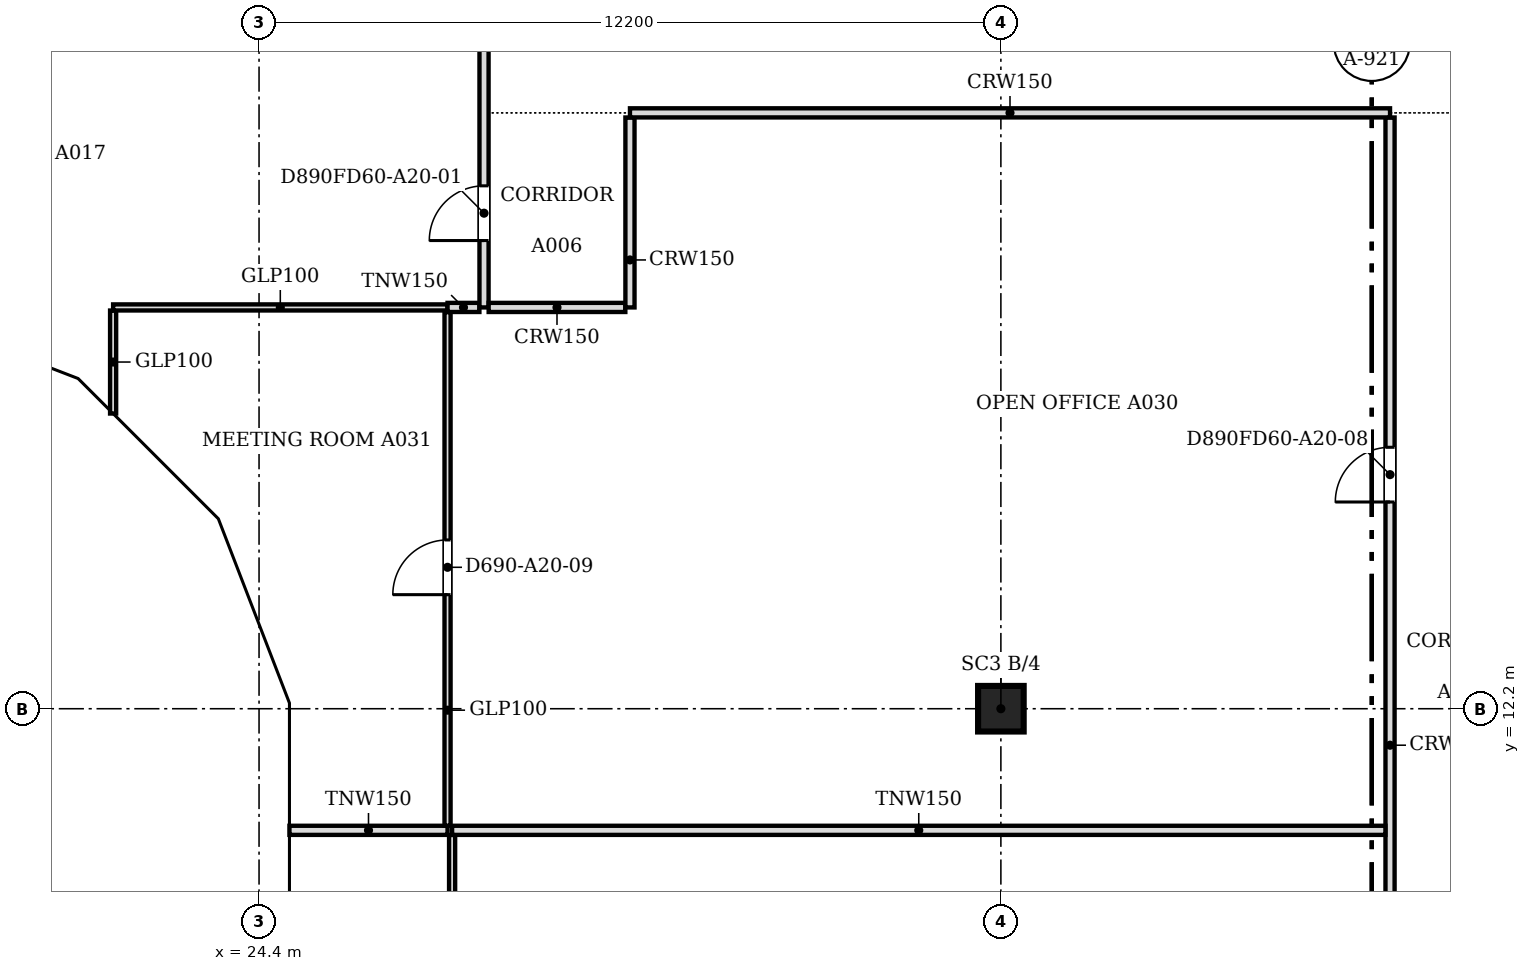
"""IFC4 building model, lengths in metres.
Left out: names, types, materials, properties, quantities, classifications, styles, units other than length and angle.
Written with IfcOpenShell. Run it as: python <this file> out.ifc"""

import sys

from ifc_helpers import new_model, si_unit, direction, frame, frame_2d, origin, origin_2d, place, context, subcontext, project, spatial, polyline, rectangle, outline, extrude, faceted_brep, source, transform, mapped, element, fill, save


model = new_model("IFC4")
c1 = context("Model", 3, precision=1e-05, world=origin(), true_north=direction((0.0, 1.0)))
c2 = subcontext(c1, "Body", "Model", "MODEL_VIEW")
j1 = project(units=[si_unit("LENGTHUNIT", "METRE"), si_unit("PLANEANGLEUNIT", "RADIAN")], contexts=[c1])
p1 = place(None, origin())
s1 = spatial("IfcSite", under=j1, at=p1, CompositionType="ELEMENT")
p2 = place(p1, origin())
s2 = spatial("IfcBuilding", under=s1, at=p2, CompositionType="ELEMENT")
p3 = place(p2, frame((0.0, 0.0, 220.7)))
s3 = spatial("IfcBuildingStorey", under=s2, at=p3, CompositionType="ELEMENT", Elevation=220.7)
p4 = place(p3, frame((36.6, 12.2, 0.0), z_axis=(0.0, 0.0, 1.0), x_axis=(1.0, 0.0, 0.0)))
e1 = element("IfcColumn", 1, at=p4, inside=s3, PredefinedType="COLUMN", context=c2, shape_type="SweptSolid", body=[
    extrude(rectangle(XDim=0.75, YDim=0.75, at=origin_2d()), origin(), (0.0, 0.0, 1.0), 3.6),
])
m1 = source(origin(), c2, "Body", "Brep", [
    faceted_brep([(0.093, -0.25, 0.056), (3.143, -0.25, 3.736), (3.143, -0.25, 3.864), (0.093, -0.25, 7.544), (0.0, 0.25, 7.543), (0.047, 0.25, 7.6), (3.196, 0.25, 3.8), (0.047, 0.25, 0.0), (0.0, 0.25, 0.057), (3.196, -0.0, 3.8), (0.047, 0.0, 0.0), (0.047, 0.0, 7.6)], [[[0, 1, 2, 3]], [[4, 5, 6, 7, 8]], [[7, 6, 9, 1, 0, 10]], [[6, 5, 11, 3, 2, 9]], [[5, 4, 11]], [[8, 7, 10]], [[8, 10, 0, 3, 11, 4]], [[1, 9, 2]]]),
])
p5 = place(p3, frame((18.303, 18.567, -3.8), z_axis=(0.0, 0.0, 1.0), x_axis=(0.932978940178, -0.359930961693, 0.0)))
e2 = element("IfcWall", 2, at=p5, inside=s3, PredefinedType="SOLIDWALL", context=c2, shape_type="MappedRepresentation", body=[
    mapped(m1, transform((0.0, 0.0, 0.0), scale=1.0)),
])
m2 = source(origin(), c2, "Body", "SweptSolid", [
    extrude(outline(polyline([(0.247, 0.633), (2.871, 3.8), (0.247, 6.967), (0.247, 0.633)])), frame((0.0, 0.26, 0.0), z_axis=(0.0, -1.0, 0.0), x_axis=(1.0, 0.0, 0.0)), (0.0, 0.0, 1.0), 0.52),
])
p6 = place(p5, origin())
e3 = element("IfcOpeningElement", 3, at=p6, cuts=e2, PredefinedType="OPENING", context=c2, shape_type="MappedRepresentation", body=[
    mapped(m2, transform((0.0, 0.0, 0.0), scale=1.0)),
])
m3 = source(origin(), c2, "Body", "Brep", [
    faceted_brep([(3.103, -0.25, 7.536), (0.053, -0.25, 3.864), (0.053, -0.25, 3.736), (3.103, -0.25, 0.064), (0.0, 0.25, 3.8), (3.156, 0.25, 7.6), (3.209, 0.25, 7.536), (3.209, 0.25, 0.064), (3.156, 0.25, 0.0), (3.156, -0.0, 0.0), (3.156, -0.0, 7.6), (0.0, 0.0, 3.8)], [[[0, 1, 2, 3]], [[4, 5, 6, 7, 8]], [[8, 7, 9]], [[6, 5, 10]], [[5, 4, 11, 1, 0, 10]], [[4, 8, 9, 3, 2, 11]], [[11, 2, 1]], [[3, 9, 7, 6, 10, 0]]]),
])
p7 = place(p3, frame((21.285, 17.417, -3.8), z_axis=(0.0, 0.0, 1.0), x_axis=(0.707106781187, -0.707106781187, 0.0)))
e4 = element("IfcWall", 4, at=p7, inside=s3, PredefinedType="SOLIDWALL", context=c2, shape_type="MappedRepresentation", body=[
    mapped(m3, transform((0.0, 0.0, 0.0), scale=1.0)),
])
m4 = source(origin(), c2, "Body", "SweptSolid", [
    extrude(outline(polyline([(2.956, 6.968), (0.325, 3.8), (2.956, 0.632), (2.956, 6.968)])), frame((0.0, 0.26, 0.0), z_axis=(0.0, -1.0, 0.0), x_axis=(1.0, 0.0, 0.0)), (0.0, 0.0, 1.0), 0.52),
])
p8 = place(p7, origin())
e5 = element("IfcOpeningElement", 5, at=p8, cuts=e4, PredefinedType="OPENING", context=c2, shape_type="MappedRepresentation", body=[
    mapped(m4, transform((0.0, 0.0, 0.0), scale=1.0)),
])
m5 = source(origin(), c2, "Body", "Brep", [
    faceted_brep([(0.106, -0.25, 0.064), (3.156, -0.25, 3.744), (3.156, -0.25, 3.856), (0.106, -0.25, 7.536), (0.0, 0.25, 7.536), (0.053, 0.25, 7.6), (3.202, 0.25, 3.8), (0.053, 0.25, 0.0), (0.0, 0.25, 0.064), (3.202, -0.0, 3.8), (0.053, 0.0, 0.0), (0.053, 0.0, 7.6)], [[[0, 1, 2, 3]], [[4, 5, 6, 7, 8]], [[7, 6, 9, 1, 0, 10]], [[6, 5, 11, 3, 2, 9]], [[5, 4, 11]], [[8, 7, 10]], [[8, 10, 0, 3, 11, 4]], [[1, 9, 2]]]),
])
p9 = place(p3, frame((23.497, 15.234, -3.8), z_axis=(0.0, 0.0, 1.0), x_axis=(0.359913782069, -0.932985567668, 0.0)))
e6 = element("IfcWall", 6, at=p9, inside=s3, PredefinedType="SOLIDWALL", context=c2, shape_type="MappedRepresentation", body=[
    mapped(m5, transform((0.0, 0.0, 0.0), scale=1.0)),
])
m6 = source(origin(), c2, "Body", "SweptSolid", [
    extrude(outline(polyline([(0.253, 0.633), (2.878, 3.8), (0.253, 6.967), (0.253, 0.633)])), frame((0.0, 0.26, 0.0), z_axis=(0.0, -1.0, 0.0), x_axis=(1.0, 0.0, 0.0)), (0.0, 0.0, 1.0), 0.52),
])
p10 = place(p9, origin())
e7 = element("IfcOpeningElement", 7, at=p10, cuts=e6, PredefinedType="OPENING", context=c2, shape_type="MappedRepresentation", body=[
    mapped(m6, transform((0.0, 0.0, 0.0), scale=1.0)),
])
m7 = source(origin(), c2, "Body", "Brep", [
    faceted_brep([(3.096, -0.25, 0.0), (6.1, -0.25, 3.8), (3.096, -0.25, 7.6), (0.047, -0.25, 3.857), (0.047, -0.25, 3.743), (0.0, 0.25, 3.8), (3.096, 0.25, 7.6), (6.053, 0.25, 3.859), (6.053, 0.25, 3.741), (3.096, 0.25, 0.0), (6.1, -0.0, 3.8), (0.0, 0.0, 3.8)], [[[0, 1, 2, 3, 4]], [[5, 6, 7, 8, 9]], [[9, 8, 10, 1, 0]], [[7, 6, 2, 1, 10]], [[6, 5, 11, 3, 2]], [[5, 9, 0, 4, 11]], [[11, 4, 3]], [[10, 8, 7]]]),
])
p11 = place(p3, frame((24.65, 12.247, -3.8), z_axis=(0.0, 0.0, 1.0), x_axis=(0.0, -1.0, 0.0)))
e8 = element("IfcWall", 8, at=p11, inside=s3, PredefinedType="SOLIDWALL", context=c2, shape_type="MappedRepresentation", body=[
    mapped(m7, transform((0.0, 0.0, 0.0), scale=1.0)),
])
m8 = source(origin(), c2, "Body", "SweptSolid", [
    extrude(outline(polyline([(3.094, 0.399), (5.781, 3.8), (3.094, 7.201), (0.323, 3.8), (3.094, 0.399)])), frame((0.0, 0.26, 0.0), z_axis=(0.0, -1.0, 0.0), x_axis=(1.0, 0.0, 0.0)), (0.0, 0.0, 1.0), 0.52),
])
p12 = place(p11, origin())
e9 = element("IfcOpeningElement", 9, at=p12, cuts=e8, PredefinedType="OPENING", context=c2, shape_type="MappedRepresentation", body=[
    mapped(m8, transform((0.0, 0.0, 0.0), scale=1.0)),
])
p13 = place(p2, frame((0.0, 0.0, 224.5)))
s4 = spatial("IfcBuildingStorey", under=s2, at=p13, CompositionType="ELEMENT", Elevation=224.5)
m9 = source(origin(), c2, "Body", "Brep", [
    faceted_brep([(3.096, -0.25, 7.536), (0.047, -0.25, 3.856), (0.047, -0.25, 3.744), (3.096, -0.25, 0.064), (0.0, 0.25, 3.8), (3.149, 0.25, 7.6), (3.202, 0.25, 7.536), (3.202, 0.25, 0.064), (3.149, 0.25, 0.0), (3.149, -0.0, 0.0), (3.149, -0.0, 7.6), (0.0, 0.0, 3.8)], [[[0, 1, 2, 3]], [[4, 5, 6, 7, 8]], [[8, 7, 9]], [[6, 5, 10]], [[5, 4, 11, 1, 0, 10]], [[4, 8, 9, 3, 2, 11]], [[11, 2, 1]], [[3, 9, 7, 6, 10, 0]]]),
])
p14 = place(p13, frame((18.346, 18.55, -3.8), z_axis=(0.0, 0.0, 1.0), x_axis=(0.932985567668, -0.359913782069, 0.0)))
e10 = element("IfcWall", 10, at=p14, inside=s4, PredefinedType="SOLIDWALL", context=c2, shape_type="MappedRepresentation", body=[
    mapped(m9, transform((0.0, 0.0, 0.0), scale=1.0)),
])
m10 = source(origin(), c2, "Body", "SweptSolid", [
    extrude(outline(polyline([(2.949, 6.967), (0.325, 3.8), (2.949, 0.633), (2.949, 6.967)])), frame((0.0, 0.26, 0.0), z_axis=(0.0, -1.0, 0.0), x_axis=(1.0, 0.0, 0.0)), (0.0, 0.0, 1.0), 0.52),
])
p15 = place(p14, origin())
e11 = element("IfcOpeningElement", 11, at=p15, cuts=e10, PredefinedType="OPENING", context=c2, shape_type="MappedRepresentation", body=[
    mapped(m10, transform((0.0, 0.0, 0.0), scale=1.0)),
])
m11 = source(origin(), c2, "Body", "Brep", [
    faceted_brep([(0.106, -0.25, 0.064), (3.156, -0.25, 3.736), (3.156, -0.25, 3.864), (0.106, -0.25, 7.536), (0.0, 0.25, 7.536), (0.053, 0.25, 7.6), (3.209, 0.25, 3.8), (0.053, 0.25, 0.0), (0.0, 0.25, 0.064), (3.209, -0.0, 3.8), (0.053, 0.0, 0.0), (0.053, 0.0, 7.6)], [[[0, 1, 2, 3]], [[4, 5, 6, 7, 8]], [[7, 6, 9, 1, 0, 10]], [[6, 5, 11, 3, 2, 9]], [[5, 4, 11]], [[8, 7, 10]], [[8, 10, 0, 3, 11, 4]], [[1, 9, 2]]]),
])
p16 = place(p13, frame((21.248, 17.454, -3.8), z_axis=(0.0, 0.0, 1.0), x_axis=(0.707106781187, -0.707106781187, 0.0)))
e12 = element("IfcWall", 12, at=p16, inside=s4, PredefinedType="SOLIDWALL", context=c2, shape_type="MappedRepresentation", body=[
    mapped(m11, transform((0.0, 0.0, 0.0), scale=1.0)),
])
m12 = source(origin(), c2, "Body", "SweptSolid", [
    extrude(outline(polyline([(0.253, 0.632), (2.884, 3.8), (0.253, 6.968), (0.253, 0.632)])), frame((0.0, 0.26, 0.0), z_axis=(0.0, -1.0, 0.0), x_axis=(1.0, 0.0, 0.0)), (0.0, 0.0, 1.0), 0.52),
])
p17 = place(p16, origin())
e13 = element("IfcOpeningElement", 13, at=p17, cuts=e12, PredefinedType="OPENING", context=c2, shape_type="MappedRepresentation", body=[
    mapped(m12, transform((0.0, 0.0, 0.0), scale=1.0)),
])
m13 = source(origin(), c2, "Body", "Brep", [
    faceted_brep([(3.103, -0.25, 7.544), (0.053, -0.25, 3.864), (0.053, -0.25, 3.736), (3.103, -0.25, 0.056), (0.0, 0.25, 3.8), (3.149, 0.25, 7.6), (3.196, 0.25, 7.543), (3.196, 0.25, 0.057), (3.149, 0.25, 0.0), (3.149, -0.0, 0.0), (3.149, -0.0, 7.6), (0.0, 0.0, 3.8)], [[[0, 1, 2, 3]], [[4, 5, 6, 7, 8]], [[8, 7, 9]], [[6, 5, 10]], [[5, 4, 11, 1, 0, 10]], [[4, 8, 9, 3, 2, 11]], [[11, 2, 1]], [[3, 9, 7, 6, 10, 0]]]),
])
p18 = place(p13, frame((23.517, 15.185, -3.8), z_axis=(0.0, 0.0, 1.0), x_axis=(0.359864468756, -0.933004589553, 0.0)))
e14 = element("IfcWall", 14, at=p18, inside=s4, PredefinedType="SOLIDWALL", context=c2, shape_type="MappedRepresentation", body=[
    mapped(m13, transform((0.0, 0.0, 0.0), scale=1.0)),
])
p19 = place(p18, origin())
e15 = element("IfcOpeningElement", 15, at=p19, cuts=e14, PredefinedType="OPENING", context=c2, shape_type="MappedRepresentation", body=[
    mapped(m10, transform((0.0, 0.0, 0.0), scale=1.0)),
])
m14 = source(origin(), c2, "Body", "Brep", [
    faceted_brep([(0.093, -0.25, 0.057), (3.143, -0.25, 3.8), (0.093, -0.25, 7.543), (0.0, 0.25, 7.544), (0.047, 0.25, 7.6), (3.143, 0.25, 3.8), (0.047, 0.25, 0.0), (0.0, 0.25, 0.056), (0.047, 0.0, 0.0), (0.047, 0.0, 7.6)], [[[0, 1, 2]], [[3, 4, 5, 6, 7]], [[6, 5, 1, 0, 8]], [[5, 4, 9, 2, 1]], [[4, 3, 9]], [[7, 6, 8]], [[7, 8, 0, 2, 9, 3]]]),
])
p20 = place(p13, frame((24.65, 12.293, -3.8), z_axis=(0.0, 0.0, 1.0), x_axis=(0.0, -1.0, 0.0)))
e16 = element("IfcWall", 16, at=p20, inside=s4, PredefinedType="SOLIDWALL", context=c2, shape_type="MappedRepresentation", body=[
    mapped(m14, transform((0.0, 0.0, 0.0), scale=1.0)),
])
m15 = source(origin(), c2, "Body", "SweptSolid", [
    extrude(outline(polyline([(0.247, 0.641), (2.821, 3.8), (0.247, 6.959), (0.247, 0.641)])), frame((0.0, 0.26, 0.0), z_axis=(0.0, -1.0, 0.0), x_axis=(1.0, 0.0, 0.0)), (0.0, 0.0, 1.0), 0.52),
])
p21 = place(p20, origin())
e17 = element("IfcOpeningElement", 17, at=p21, cuts=e16, PredefinedType="OPENING", context=c2, shape_type="MappedRepresentation", body=[
    mapped(m15, transform((0.0, 0.0, 0.0), scale=1.0)),
])
p22 = place(p3, frame((43.0, 0.5, 0.0), z_axis=(0.0, 0.0, 1.0), x_axis=(0.0, 1.0, 0.0)))
e18 = element("IfcWall", 18, at=p22, inside=s3, PredefinedType="PARTITIONING", context=c2, shape_type="SweptSolid", body=[
    extrude(rectangle(XDim=21.424, YDim=0.15, at=frame_2d((10.712, 0.0))), origin(), (0.0, 0.0, 1.0), 3.067),
])
m16 = source(origin(), c2, "Body", "SweptSolid", [
    extrude(rectangle(XDim=0.9, YDim=2.1, at=frame_2d((0.45, 1.05))), frame((0.0, 0.085, 0.0), z_axis=(0.0, -1.0, 0.0), x_axis=(1.0, 0.0, 0.0)), (0.0, 0.0, 1.0), 0.17),
])
p23 = place(p22, frame((6.2, 0.0, 0.0)))
e19 = element("IfcOpeningElement", 19, at=p23, cuts=e18, PredefinedType="OPENING", context=c2, shape_type="MappedRepresentation", body=[
    mapped(m16, transform((0.0, 0.0, 0.0), scale=1.0)),
])
p24 = place(p22, frame((15.1, 0.0, 0.0)))
e20 = element("IfcOpeningElement", 20, at=p24, cuts=e18, PredefinedType="OPENING", context=c2, shape_type="MappedRepresentation", body=[
    mapped(m16, transform((0.0, 0.0, 0.0), scale=1.0)),
])
p25 = place(p3, frame((27.575, 4.2, 0.0), z_axis=(0.0, 0.0, 1.0), x_axis=(0.0, 1.0, 0.0)))
e21 = element("IfcWall", 21, at=p25, inside=s3, PredefinedType="PARTITIONING", context=c2, shape_type="SweptSolid", body=[
    extrude(rectangle(XDim=5.924, YDim=0.1, at=frame_2d((2.962, 0.0))), origin(), (0.0, 0.0, 1.0), 3.067),
])
m17 = source(origin(), c2, "Body", "SweptSolid", [
    extrude(rectangle(XDim=0.9, YDim=2.1, at=frame_2d((0.45, 1.05))), frame((0.0, 0.06, 0.0), z_axis=(0.0, -1.0, 0.0), x_axis=(1.0, 0.0, 0.0)), (0.0, 0.0, 1.0), 0.12),
])
p26 = place(p25, frame((2.5, 0.0, 0.0)))
e22 = element("IfcOpeningElement", 22, at=p26, cuts=e21, PredefinedType="OPENING", context=c2, shape_type="MappedRepresentation", body=[
    mapped(m17, transform((0.0, 0.0, 0.0), scale=1.0)),
])
p27 = place(p3, frame((24.9, 10.2, 0.0), z_axis=(0.0, 0.0, 1.0), x_axis=(1.0, 0.0, 0.0)))
e23 = element("IfcWall", 23, at=p27, inside=s3, PredefinedType="PARTITIONING", context=c2, shape_type="SweptSolid", body=[
    extrude(rectangle(XDim=2.6, YDim=0.15, at=frame_2d((1.3, 0.0))), origin(), (0.0, 0.0, 1.0), 3.067),
])
p28 = place(p3, frame((27.575, 10.2, 0.0), z_axis=(0.0, 0.0, 1.0), x_axis=(1.0, 0.0, 0.0)))
e24 = element("IfcWall", 24, at=p28, inside=s3, PredefinedType="PARTITIONING", context=c2, shape_type="SweptSolid", body=[
    extrude(rectangle(XDim=15.349, YDim=0.15, at=frame_2d((7.675, 0.0))), origin(), (0.0, 0.0, 1.0), 3.067),
])
p29 = place(p3, frame((27.5, 10.276, 0.0), z_axis=(0.0, 0.0, 1.0), x_axis=(0.0, 1.0, 0.0)))
e25 = element("IfcWall", 25, at=p29, inside=s3, PredefinedType="PARTITIONING", context=c2, shape_type="SweptSolid", body=[
    extrude(rectangle(XDim=8.448, YDim=0.1, at=frame_2d((4.224, 0.0))), origin(), (0.0, 0.0, 1.0), 3.067),
])
p30 = place(p29, frame((3.8, 0.0, 0.0)))
e26 = element("IfcOpeningElement", 26, at=p30, cuts=e25, PredefinedType="OPENING", context=c2, shape_type="MappedRepresentation", body=[
    mapped(m17, transform((0.0, 0.0, 0.0), scale=1.0)),
])
p31 = place(p3, frame((22.0, 17.055, 0.0), z_axis=(0.0, 0.0, 1.0), x_axis=(0.0, 1.0, 0.0)))
e27 = element("IfcWall", 27, at=p31, inside=s3, PredefinedType="PARTITIONING", context=c2, shape_type="SweptSolid", body=[
    extrude(rectangle(XDim=1.694, YDim=0.1, at=frame_2d((0.847, 0.0))), origin(), (0.0, 0.0, 1.0), 3.067),
])
p32 = place(p3, frame((22.0, 18.8, 0.0), z_axis=(0.0, 0.0, 1.0), x_axis=(1.0, 0.0, 0.0)))
e28 = element("IfcWall", 28, at=p32, inside=s3, PredefinedType="PARTITIONING", context=c2, shape_type="SweptSolid", body=[
    extrude(rectangle(XDim=5.499, YDim=0.1, at=frame_2d((2.75, 0.0))), origin(), (0.0, 0.0, 1.0), 3.067),
])
p33 = place(p3, frame((27.5, 18.8, 0.0), z_axis=(0.0, 0.0, 1.0), x_axis=(1.0, 0.0, 0.0)))
e29 = element("IfcWall", 29, at=p33, inside=s3, PredefinedType="PARTITIONING", context=c2, shape_type="SweptSolid", body=[
    extrude(rectangle(XDim=0.524, YDim=0.15, at=frame_2d((0.262, 0.0))), origin(), (0.0, 0.0, 1.0), 3.067),
])
p34 = place(p3, frame((28.1, 18.8, 0.0), z_axis=(0.0, 0.0, 1.0), x_axis=(0.0, 1.0, 0.0)))
e30 = element("IfcWall", 30, at=p34, inside=s3, PredefinedType="PARTITIONING", context=c2, shape_type="SweptSolid", body=[
    extrude(rectangle(XDim=26.424, YDim=0.15, at=frame_2d((13.212, 0.0))), origin(), (0.0, 0.0, 1.0), 3.067),
])
p35 = place(p34, frame((1.1, 0.0, 0.0)))
e31 = element("IfcOpeningElement", 31, at=p35, cuts=e30, PredefinedType="OPENING", context=c2, shape_type="MappedRepresentation", body=[
    mapped(m16, transform((0.0, 0.0, 0.0), scale=1.0)),
])
p36 = place(p34, frame((23.151, 0.0, 0.0)))
e32 = element("IfcOpeningElement", 32, at=p36, cuts=e30, PredefinedType="OPENING", context=c2, shape_type="MappedRepresentation", body=[
    mapped(m16, transform((0.0, 0.0, 0.0), scale=1.0)),
])
p37 = place(p34, frame((8.2, 0.0, 0.0)))
e33 = element("IfcOpeningElement", 33, at=p37, cuts=e30, PredefinedType="OPENING", context=c2, shape_type="MappedRepresentation", body=[
    mapped(m16, transform((0.0, 0.0, 0.0), scale=1.0)),
])
p38 = place(p34, frame((15.8, 0.0, 0.0)))
e34 = element("IfcOpeningElement", 34, at=p38, cuts=e30, PredefinedType="OPENING", context=c2, shape_type="MappedRepresentation", body=[
    mapped(m16, transform((0.0, 0.0, 0.0), scale=1.0)),
])
p39 = place(p3, frame((28.176, 18.8, 0.0), z_axis=(0.0, 0.0, 1.0), x_axis=(1.0, 0.0, 0.0)))
e35 = element("IfcWall", 35, at=p39, inside=s3, PredefinedType="PARTITIONING", context=c2, shape_type="SweptSolid", body=[
    extrude(rectangle(XDim=2.248, YDim=0.15, at=frame_2d((1.124, 0.0))), origin(), (0.0, 0.0, 1.0), 3.067),
])
p40 = place(p3, frame((30.5, 18.8, 0.0), z_axis=(0.0, 0.0, 1.0), x_axis=(0.0, 1.0, 0.0)))
e36 = element("IfcWall", 36, at=p40, inside=s3, PredefinedType="PARTITIONING", context=c2, shape_type="SweptSolid", body=[
    extrude(rectangle(XDim=3.124, YDim=0.15, at=frame_2d((1.562, 0.0))), origin(), (0.0, 0.0, 1.0), 3.067),
])
p41 = place(p3, frame((30.5, 22.0, 0.0), z_axis=(0.0, 0.0, 1.0), x_axis=(1.0, 0.0, 0.0)))
e37 = element("IfcWall", 37, at=p41, inside=s3, PredefinedType="PARTITIONING", context=c2, shape_type="SweptSolid", body=[
    extrude(rectangle(XDim=12.5, YDim=0.15, at=frame_2d((6.25, 0.0))), origin(), (0.0, 0.0, 1.0), 3.067),
])
m18 = source(origin(), c2, "Body", "SweptSolid", [
    extrude(rectangle(XDim=0.9, YDim=2.1, at=frame_2d((0.45, 1.05))), frame((0.0, 0.025, 0.0), z_axis=(0.0, -1.0, 0.0), x_axis=(1.0, 0.0, 0.0)), (0.0, 0.0, 1.0), 0.05),
])
p42 = place(p35, origin())
e38 = element("IfcDoor", 38, at=p42, inside=s3, OperationType="SINGLE_SWING_LEFT", PredefinedType="DOOR", context=c2, shape_type="MappedRepresentation", body=[
    mapped(m18, transform((0.0, 0.0, 0.0), scale=1.0)),
])
fill(e31, e38)
p43 = place(p30, origin())
e39 = element("IfcDoor", 39, at=p43, inside=s3, OperationType="SINGLE_SWING_LEFT", PredefinedType="DOOR", context=c2, shape_type="MappedRepresentation", body=[
    mapped(m18, transform((0.0, 0.0, 0.0), scale=1.0)),
])
fill(e26, e39)
p44 = place(p24, origin())
e40 = element("IfcDoor", 40, at=p44, inside=s3, OperationType="SINGLE_SWING_LEFT", PredefinedType="DOOR", context=c2, shape_type="MappedRepresentation", body=[
    mapped(m18, transform((0.0, 0.0, 0.0), scale=1.0)),
])
fill(e20, e40)
save(model, sys.argv[1])
